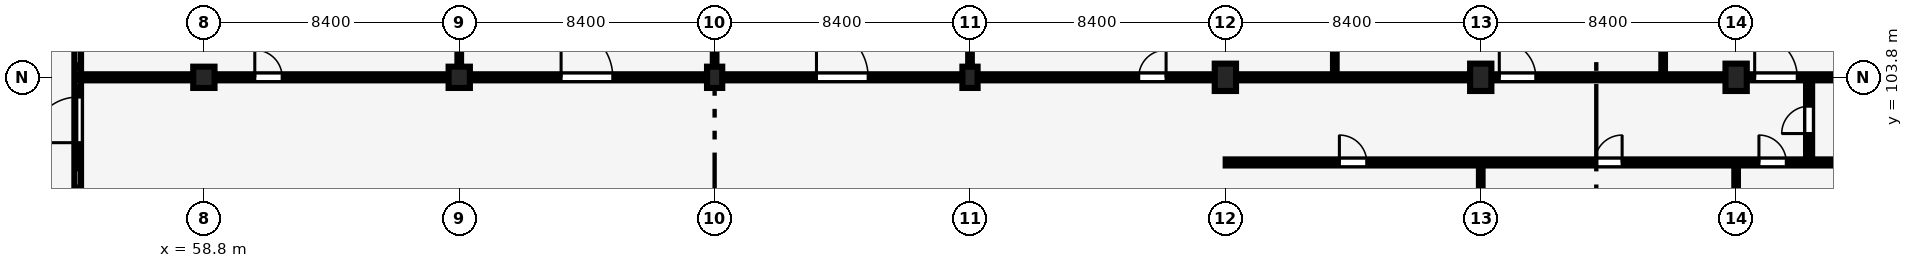
"""IFC4 building model, lengths in metres.
Left out: names, types, materials, properties, quantities, classifications, styles, units other than length and angle.
Written with IfcOpenShell. Run it as: python <this file> out.ifc"""

import sys

from ifc_helpers import new_model, si_unit, direction, frame, frame_2d, origin, origin_2d, place, context, subcontext, project, spatial, rectangle, extrude, element, fill, save


model = new_model("IFC4")
c1 = context("Model", 3, precision=1e-05, world=origin(), true_north=direction((0.0, 1.0)))
c2 = subcontext(c1, "Body", "Model", "MODEL_VIEW")
j1 = project(units=[si_unit("LENGTHUNIT", "METRE"), si_unit("PLANEANGLEUNIT", "RADIAN")], contexts=[c1])
p1 = place(None, origin())
s1 = spatial("IfcSite", under=j1, at=p1, CompositionType="ELEMENT")
p2 = place(p1, origin())
s2 = spatial("IfcBuilding", under=s1, at=p2, CompositionType="ELEMENT")
p3 = place(p2, origin())
s3 = spatial("IfcBuildingStorey", under=s2, at=p3, CompositionType="ELEMENT", Elevation=0.0)
for number, where, z_axis, x_axis in (
    (1, (58.8, 103.8, 0.0), (0.0, 0.0, 1.0), (1.0, 0.0, 0.0)),
    (2, (67.2, 103.8, 0.0), (0.0, 0.0, 1.0), (1.0, 0.0, 0.0)),
):
    element("IfcColumn", number, at=place(p3, frame(where, z_axis=z_axis, x_axis=x_axis)), inside=s3, PredefinedType="COLUMN", context=c2, shape_type="SweptSolid", body=[
        extrude(rectangle(XDim=0.7, YDim=0.7, at=origin_2d()), origin(), (0.0, 0.0, 1.0), 4.8),
    ])
for number, where, z_axis, x_axis in (
    (3, (75.6, 103.8, 0.0), (0.0, 0.0, 1.0), (1.0, 0.0, 0.0)),
    (4, (84.0, 103.8, 0.0), (0.0, 0.0, 1.0), (1.0, 0.0, 0.0)),
):
    element("IfcColumn", number, at=place(p3, frame(where, z_axis=z_axis, x_axis=x_axis)), inside=s3, PredefinedType="COLUMN", context=c2, shape_type="SweptSolid", body=[
        extrude(rectangle(XDim=0.5, YDim=0.7, at=origin_2d()), origin(), (0.0, 0.0, 1.0), 4.8),
    ])
for number, where, z_axis, x_axis in (
    (5, (92.4, 103.8, 0.0), (0.0, 0.0, 1.0), (1.0, 0.0, 0.0)),
    (6, (100.8, 103.8, 0.0), (0.0, 0.0, 1.0), (1.0, 0.0, 0.0)),
    (7, (109.2, 103.8, 0.0), (0.0, 0.0, 1.0), (1.0, 0.0, 0.0)),
):
    element("IfcColumn", number, at=place(p3, frame(where, z_axis=z_axis, x_axis=x_axis)), inside=s3, PredefinedType="COLUMN", context=c2, shape_type="SweptSolid", body=[
        extrude(rectangle(XDim=0.7, YDim=0.9, at=origin_2d()), origin(), (0.0, 0.0, 1.0), 4.8),
    ])
p4 = place(p3, frame((111.6, 101.01, 0.0), z_axis=(0.0, 0.0, 1.0), x_axis=(0.0, 1.0, 0.0)))
e8 = element("IfcWall", 8, at=p4, inside=s3, PredefinedType="PARTITIONING", context=c2, shape_type="SweptSolid", body=[
    extrude(rectangle(XDim=2.78, YDim=0.2, at=frame_2d((1.39, 0.0))), origin(), (0.0, 0.0, 1.0), 4.5),
])
p5 = place(p4, frame((0.94, 0.0, 0.0)))
e9 = element("IfcOpeningElement", 9, at=p5, cuts=e8, PredefinedType="OPENING", context=c2, shape_type="SweptSolid", body=[
    extrude(rectangle(XDim=0.9, YDim=2.1, at=frame_2d((0.45, 1.05))), frame((0.0, 0.11, 0.0), z_axis=(0.0, -1.0, 0.0), x_axis=(1.0, 0.0, 0.0)), (0.0, 0.0, 1.0), 0.22),
])
p6 = place(p3, frame((54.65, 99.47, 0.0), z_axis=(0.0, 0.0, 1.0), x_axis=(0.0, 1.0, 0.0)))
e10 = element("IfcWall", 10, at=p6, inside=s3, PredefinedType="SOLIDWALL", context=c2, shape_type="SweptSolid", body=[
    extrude(rectangle(XDim=13.165, YDim=0.22, at=frame_2d((6.583, 0.0))), origin(), (0.0, 0.0, 1.0), 4.5),
])
p7 = place(p6, frame((2.18, 0.0, 0.0)))
e11 = element("IfcOpeningElement", 11, at=p7, cuts=e10, PredefinedType="OPENING", context=c2, shape_type="SweptSolid", body=[
    extrude(rectangle(XDim=1.5, YDim=2.2, at=frame_2d((0.75, 1.1))), frame((0.0, 0.12, 0.0), z_axis=(0.0, -1.0, 0.0), x_axis=(1.0, 0.0, 0.0)), (0.0, 0.0, 1.0), 0.24),
])
p8 = place(p3, frame((67.2, 103.905, 0.0), z_axis=(0.0, 0.0, 1.0), x_axis=(0.0, 1.0, 0.0)))
e12 = element("IfcWall", 12, at=p8, inside=s3, PredefinedType="PARTITIONING", context=c2, shape_type="SweptSolid", body=[
    extrude(rectangle(XDim=8.73, YDim=0.12, at=frame_2d((4.365, 0.0))), origin(), (0.0, 0.0, 1.0), 3.52),
])
p9 = place(p3, frame((75.6, 103.905, 0.0), z_axis=(0.0, 0.0, 1.0), x_axis=(0.0, 1.0, 0.0)))
e13 = element("IfcWall", 13, at=p9, inside=s3, PredefinedType="PARTITIONING", context=c2, shape_type="SweptSolid", body=[
    extrude(rectangle(XDim=8.73, YDim=0.12, at=frame_2d((4.365, 0.0))), origin(), (0.0, 0.0, 1.0), 3.87),
])
p10 = place(p3, frame((84.0, 103.905, 0.0), z_axis=(0.0, 0.0, 1.0), x_axis=(0.0, 1.0, 0.0)))
e14 = element("IfcWall", 14, at=p10, inside=s3, PredefinedType="PARTITIONING", context=c2, shape_type="SweptSolid", body=[
    extrude(rectangle(XDim=8.73, YDim=0.12, at=frame_2d((4.365, 0.0))), origin(), (0.0, 0.0, 1.0), 3.72),
])
p11 = place(p3, frame((96.0, 103.905, 0.0), z_axis=(0.0, 0.0, 1.0), x_axis=(0.0, 1.0, 0.0)))
e15 = element("IfcWall", 15, at=p11, inside=s3, PredefinedType="PARTITIONING", context=c2, shape_type="SweptSolid", body=[
    extrude(rectangle(XDim=8.73, YDim=0.12, at=frame_2d((4.365, 0.0))), origin(), (0.0, 0.0, 1.0), 4.5),
])
p12 = place(p3, frame((106.8, 103.905, 0.0), z_axis=(0.0, 0.0, 1.0), x_axis=(0.0, 1.0, 0.0)))
e16 = element("IfcWall", 16, at=p12, inside=s3, PredefinedType="PARTITIONING", context=c2, shape_type="SweptSolid", body=[
    extrude(rectangle(XDim=8.79, YDim=0.12, at=frame_2d((4.395, 0.0))), origin(), (0.0, 0.0, 1.0), 4.5),
])
p13 = place(p3, frame((54.66, 103.8, 0.0), z_axis=(0.0, 0.0, 1.0), x_axis=(1.0, 0.0, 0.0)))
e17 = element("IfcWall", 17, at=p13, inside=s3, PredefinedType="PARTITIONING", context=c2, shape_type="SweptSolid", body=[
    extrude(rectangle(XDim=3.78, YDim=0.2, at=frame_2d((1.89, 0.0))), origin(), (0.0, 0.0, 1.0), 3.67),
])
p14 = place(p3, frame((59.16, 103.8, 0.0), z_axis=(0.0, 0.0, 1.0), x_axis=(1.0, 0.0, 0.0)))
e18 = element("IfcWall", 18, at=p14, inside=s3, PredefinedType="PARTITIONING", context=c2, shape_type="SweptSolid", body=[
    extrude(rectangle(XDim=7.68, YDim=0.2, at=frame_2d((3.84, 0.0))), origin(), (0.0, 0.0, 1.0), 3.62),
])
p15 = place(p14, frame((1.315, 0.0, 0.0)))
e19 = element("IfcOpeningElement", 19, at=p15, cuts=e18, PredefinedType="OPENING", context=c2, shape_type="SweptSolid", body=[
    extrude(rectangle(XDim=0.9, YDim=2.1, at=frame_2d((0.45, 1.05))), frame((0.0, 0.11, 0.0), z_axis=(0.0, -1.0, 0.0), x_axis=(1.0, 0.0, 0.0)), (0.0, 0.0, 1.0), 0.22),
])
p16 = place(p3, frame((67.56, 103.8, 0.0), z_axis=(0.0, 0.0, 1.0), x_axis=(1.0, 0.0, 0.0)))
e20 = element("IfcWall", 20, at=p16, inside=s3, PredefinedType="PARTITIONING", context=c2, shape_type="SweptSolid", body=[
    extrude(rectangle(XDim=7.78, YDim=0.2, at=frame_2d((3.89, 0.0))), origin(), (0.0, 0.0, 1.0), 3.57),
])
p17 = place(p16, frame((2.99, 0.0, 0.0)))
e21 = element("IfcOpeningElement", 21, at=p17, cuts=e20, PredefinedType="OPENING", context=c2, shape_type="SweptSolid", body=[
    extrude(rectangle(XDim=1.7, YDim=2.25, at=frame_2d((0.85, 1.125))), frame((0.0, 0.11, 0.0), z_axis=(0.0, -1.0, 0.0), x_axis=(1.0, 0.0, 0.0)), (0.0, 0.0, 1.0), 0.22),
])
p18 = place(p3, frame((75.86, 103.8, 0.0), z_axis=(0.0, 0.0, 1.0), x_axis=(1.0, 0.0, 0.0)))
e22 = element("IfcWall", 22, at=p18, inside=s3, PredefinedType="PARTITIONING", context=c2, shape_type="SweptSolid", body=[
    extrude(rectangle(XDim=7.88, YDim=0.2, at=frame_2d((3.94, 0.0))), origin(), (0.0, 0.0, 1.0), 3.57),
])
p19 = place(p18, frame((3.09, 0.0, 0.0)))
e23 = element("IfcOpeningElement", 23, at=p19, cuts=e22, PredefinedType="OPENING", context=c2, shape_type="SweptSolid", body=[
    extrude(rectangle(XDim=1.7, YDim=2.25, at=frame_2d((0.85, 1.125))), frame((0.0, 0.11, 0.0), z_axis=(0.0, -1.0, 0.0), x_axis=(1.0, 0.0, 0.0)), (0.0, 0.0, 1.0), 0.22),
])
p20 = place(p3, frame((84.26, 103.8, 0.0), z_axis=(0.0, 0.0, 1.0), x_axis=(1.0, 0.0, 0.0)))
e24 = element("IfcWall", 24, at=p20, inside=s3, PredefinedType="PARTITIONING", context=c2, shape_type="SweptSolid", body=[
    extrude(rectangle(XDim=7.78, YDim=0.2, at=frame_2d((3.89, 0.0))), origin(), (0.0, 0.0, 1.0), 3.52),
])
p21 = place(p20, frame((5.29, 0.0, 0.0)))
e25 = element("IfcOpeningElement", 25, at=p21, cuts=e24, PredefinedType="OPENING", context=c2, shape_type="SweptSolid", body=[
    extrude(rectangle(XDim=0.9, YDim=2.1, at=frame_2d((0.45, 1.05))), frame((0.0, 0.11, 0.0), z_axis=(0.0, -1.0, 0.0), x_axis=(1.0, 0.0, 0.0)), (0.0, 0.0, 1.0), 0.22),
])
p22 = place(p3, frame((92.76, 103.8, 0.0), z_axis=(0.0, 0.0, 1.0), x_axis=(1.0, 0.0, 0.0)))
e26 = element("IfcWall", 26, at=p22, inside=s3, PredefinedType="PARTITIONING", context=c2, shape_type="SweptSolid", body=[
    extrude(rectangle(XDim=7.68, YDim=0.2, at=frame_2d((3.84, 0.0))), origin(), (0.0, 0.0, 1.0), 3.47),
])
p23 = place(p3, frame((101.16, 103.8, 0.0), z_axis=(0.0, 0.0, 1.0), x_axis=(1.0, 0.0, 0.0)))
e27 = element("IfcWall", 27, at=p23, inside=s3, PredefinedType="PARTITIONING", context=c2, shape_type="SweptSolid", body=[
    extrude(rectangle(XDim=7.68, YDim=0.2, at=frame_2d((3.84, 0.0))), origin(), (0.0, 0.0, 1.0), 3.37),
])
p24 = place(p23, frame((0.25, 0.0, 0.0)))
e28 = element("IfcOpeningElement", 28, at=p24, cuts=e27, PredefinedType="OPENING", context=c2, shape_type="SweptSolid", body=[
    extrude(rectangle(XDim=1.2, YDim=2.2, at=frame_2d((0.6, 1.1))), frame((0.0, 0.11, 0.0), z_axis=(0.0, -1.0, 0.0), x_axis=(1.0, 0.0, 0.0)), (0.0, 0.0, 1.0), 0.22),
])
p25 = place(p3, frame((109.56, 103.8, 0.0), z_axis=(0.0, 0.0, 1.0), x_axis=(1.0, 0.0, 0.0)))
e29 = element("IfcWall", 29, at=p25, inside=s3, PredefinedType="PARTITIONING", context=c2, shape_type="SweptSolid", body=[
    extrude(rectangle(XDim=7.845, YDim=0.2, at=frame_2d((3.922, 0.0))), origin(), (0.0, 0.0, 1.0), 3.92),
])
p26 = place(p25, frame((0.25, 0.0, 0.0)))
e30 = element("IfcOpeningElement", 30, at=p26, cuts=e29, PredefinedType="OPENING", context=c2, shape_type="SweptSolid", body=[
    extrude(rectangle(XDim=1.4, YDim=2.2, at=frame_2d((0.7, 1.1))), frame((0.0, 0.11, 0.0), z_axis=(0.0, -1.0, 0.0), x_axis=(1.0, 0.0, 0.0)), (0.0, 0.0, 1.0), 0.22),
])
p27 = place(p3, frame((100.8, 95.26, 0.0), z_axis=(0.0, 0.0, 1.0), x_axis=(0.0, 1.0, 0.0)))
e31 = element("IfcWall", 31, at=p27, inside=s3, PredefinedType="PARTITIONING", context=c2, shape_type="SweptSolid", body=[
    extrude(rectangle(XDim=5.635, YDim=0.12, at=frame_2d((2.817, 0.0))), origin(), (0.0, 0.0, 1.0), 3.62),
])
p28 = place(p3, frame((109.2, 95.26, 0.0), z_axis=(0.0, 0.0, 1.0), x_axis=(0.0, 1.0, 0.0)))
e32 = element("IfcWall", 32, at=p28, inside=s3, PredefinedType="PARTITIONING", context=c2, shape_type="SweptSolid", body=[
    extrude(rectangle(XDim=5.635, YDim=0.12, at=frame_2d((2.817, 0.0))), origin(), (0.0, 0.0, 1.0), 3.72),
])
p29 = place(p3, frame((92.41, 101.0, 0.0), z_axis=(0.0, 0.0, 1.0), x_axis=(1.0, 0.0, 0.0)))
e33 = element("IfcWall", 33, at=p29, inside=s3, PredefinedType="PARTITIONING", context=c2, shape_type="SweptSolid", body=[
    extrude(rectangle(XDim=24.995, YDim=0.2, at=frame_2d((12.498, 0.0))), origin(), (0.0, 0.0, 1.0), 4.04),
])
p30 = place(p29, frame((3.74, 0.0, 0.0)))
e34 = element("IfcOpeningElement", 34, at=p30, cuts=e33, PredefinedType="OPENING", context=c2, shape_type="SweptSolid", body=[
    extrude(rectangle(XDim=0.9, YDim=2.1, at=frame_2d((0.45, 1.05))), frame((0.0, 0.11, 0.0), z_axis=(0.0, -1.0, 0.0), x_axis=(1.0, 0.0, 0.0)), (0.0, 0.0, 1.0), 0.22),
])
p31 = place(p29, frame((12.14, 0.0, 0.0)))
e35 = element("IfcOpeningElement", 35, at=p31, cuts=e33, PredefinedType="OPENING", context=c2, shape_type="SweptSolid", body=[
    extrude(rectangle(XDim=0.9, YDim=2.1, at=frame_2d((0.45, 1.05))), frame((0.0, 0.11, 0.0), z_axis=(0.0, -1.0, 0.0), x_axis=(1.0, 0.0, 0.0)), (0.0, 0.0, 1.0), 0.22),
])
p32 = place(p29, frame((17.54, 0.0, 0.0)))
e36 = element("IfcOpeningElement", 36, at=p32, cuts=e33, PredefinedType="OPENING", context=c2, shape_type="SweptSolid", body=[
    extrude(rectangle(XDim=0.9, YDim=2.1, at=frame_2d((0.45, 1.05))), frame((0.0, 0.11, 0.0), z_axis=(0.0, -1.0, 0.0), x_axis=(1.0, 0.0, 0.0)), (0.0, 0.0, 1.0), 0.22),
])
p33 = place(p5, origin())
e37 = element("IfcDoor", 37, at=p33, inside=s3, OperationType="SINGLE_SWING_LEFT", PredefinedType="DOOR", context=c2, shape_type="SweptSolid", body=[
    extrude(rectangle(XDim=0.9, YDim=2.1, at=frame_2d((0.45, 1.05))), frame((0.0, 0.025, 0.0), z_axis=(0.0, -1.0, 0.0), x_axis=(1.0, 0.0, 0.0)), (0.0, 0.0, 1.0), 0.05),
])
fill(e9, e37)
p34 = place(p7, origin())
e38 = element("IfcDoor", 38, at=p34, inside=s3, OperationType="DOUBLE_DOOR_SINGLE_SWING", PredefinedType="DOOR", context=c2, shape_type="SweptSolid", body=[
    extrude(rectangle(XDim=1.5, YDim=2.2, at=frame_2d((0.75, 1.1))), frame((0.0, 0.025, 0.0), z_axis=(0.0, -1.0, 0.0), x_axis=(1.0, 0.0, 0.0)), (0.0, 0.0, 1.0), 0.05),
])
fill(e11, e38)
p35 = place(p15, origin())
e39 = element("IfcDoor", 39, at=p35, inside=s3, OperationType="SINGLE_SWING_LEFT", PredefinedType="DOOR", context=c2, shape_type="SweptSolid", body=[
    extrude(rectangle(XDim=0.9, YDim=2.1, at=frame_2d((0.45, 1.05))), frame((0.0, 0.025, 0.0), z_axis=(0.0, -1.0, 0.0), x_axis=(1.0, 0.0, 0.0)), (0.0, 0.0, 1.0), 0.05),
])
fill(e19, e39)
p36 = place(p17, origin())
e40 = element("IfcDoor", 40, at=p36, inside=s3, OperationType="DOUBLE_DOOR_SINGLE_SWING", PredefinedType="DOOR", context=c2, shape_type="SweptSolid", body=[
    extrude(rectangle(XDim=1.7, YDim=2.25, at=frame_2d((0.85, 1.125))), frame((0.0, 0.025, 0.0), z_axis=(0.0, -1.0, 0.0), x_axis=(1.0, 0.0, 0.0)), (0.0, 0.0, 1.0), 0.05),
])
fill(e21, e40)
p37 = place(p19, origin())
e41 = element("IfcDoor", 41, at=p37, inside=s3, OperationType="DOUBLE_DOOR_SINGLE_SWING", PredefinedType="DOOR", context=c2, shape_type="SweptSolid", body=[
    extrude(rectangle(XDim=1.7, YDim=2.25, at=frame_2d((0.85, 1.125))), frame((0.0, 0.025, 0.0), z_axis=(0.0, -1.0, 0.0), x_axis=(1.0, 0.0, 0.0)), (0.0, 0.0, 1.0), 0.05),
])
fill(e23, e41)
p38 = place(p21, origin())
e42 = element("IfcDoor", 42, at=p38, inside=s3, OperationType="SINGLE_SWING_RIGHT", PredefinedType="DOOR", context=c2, shape_type="SweptSolid", body=[
    extrude(rectangle(XDim=0.9, YDim=2.1, at=frame_2d((0.45, 1.05))), frame((0.0, 0.025, 0.0), z_axis=(0.0, -1.0, 0.0), x_axis=(1.0, 0.0, 0.0)), (0.0, 0.0, 1.0), 0.05),
])
fill(e25, e42)
p39 = place(p24, origin())
e43 = element("IfcDoor", 43, at=p39, inside=s3, OperationType="SINGLE_SWING_LEFT", PredefinedType="DOOR", context=c2, shape_type="SweptSolid", body=[
    extrude(rectangle(XDim=1.2, YDim=2.2, at=frame_2d((0.6, 1.1))), frame((0.0, 0.025, 0.0), z_axis=(0.0, -1.0, 0.0), x_axis=(1.0, 0.0, 0.0)), (0.0, 0.0, 1.0), 0.05),
])
fill(e28, e43)
p40 = place(p26, origin())
e44 = element("IfcDoor", 44, at=p40, inside=s3, OperationType="DOUBLE_DOOR_SINGLE_SWING", PredefinedType="DOOR", context=c2, shape_type="SweptSolid", body=[
    extrude(rectangle(XDim=1.4, YDim=2.2, at=frame_2d((0.7, 1.1))), frame((0.0, 0.025, 0.0), z_axis=(0.0, -1.0, 0.0), x_axis=(1.0, 0.0, 0.0)), (0.0, 0.0, 1.0), 0.05),
])
fill(e30, e44)
p41 = place(p30, origin())
e45 = element("IfcDoor", 45, at=p41, inside=s3, OperationType="SINGLE_SWING_LEFT", PredefinedType="DOOR", context=c2, shape_type="SweptSolid", body=[
    extrude(rectangle(XDim=0.9, YDim=2.1, at=frame_2d((0.45, 1.05))), frame((0.0, 0.025, 0.0), z_axis=(0.0, -1.0, 0.0), x_axis=(1.0, 0.0, 0.0)), (0.0, 0.0, 1.0), 0.05),
])
fill(e34, e45)
p42 = place(p31, origin())
e46 = element("IfcDoor", 46, at=p42, inside=s3, OperationType="SINGLE_SWING_RIGHT", PredefinedType="DOOR", context=c2, shape_type="SweptSolid", body=[
    extrude(rectangle(XDim=0.9, YDim=2.1, at=frame_2d((0.45, 1.05))), frame((0.0, 0.025, 0.0), z_axis=(0.0, -1.0, 0.0), x_axis=(1.0, 0.0, 0.0)), (0.0, 0.0, 1.0), 0.05),
])
fill(e35, e46)
p43 = place(p32, origin())
e47 = element("IfcDoor", 47, at=p43, inside=s3, OperationType="SINGLE_SWING_LEFT", PredefinedType="DOOR", context=c2, shape_type="SweptSolid", body=[
    extrude(rectangle(XDim=0.9, YDim=2.1, at=frame_2d((0.45, 1.05))), frame((0.0, 0.025, 0.0), z_axis=(0.0, -1.0, 0.0), x_axis=(1.0, 0.0, 0.0)), (0.0, 0.0, 1.0), 0.05),
])
fill(e36, e47)
save(model, sys.argv[1])
